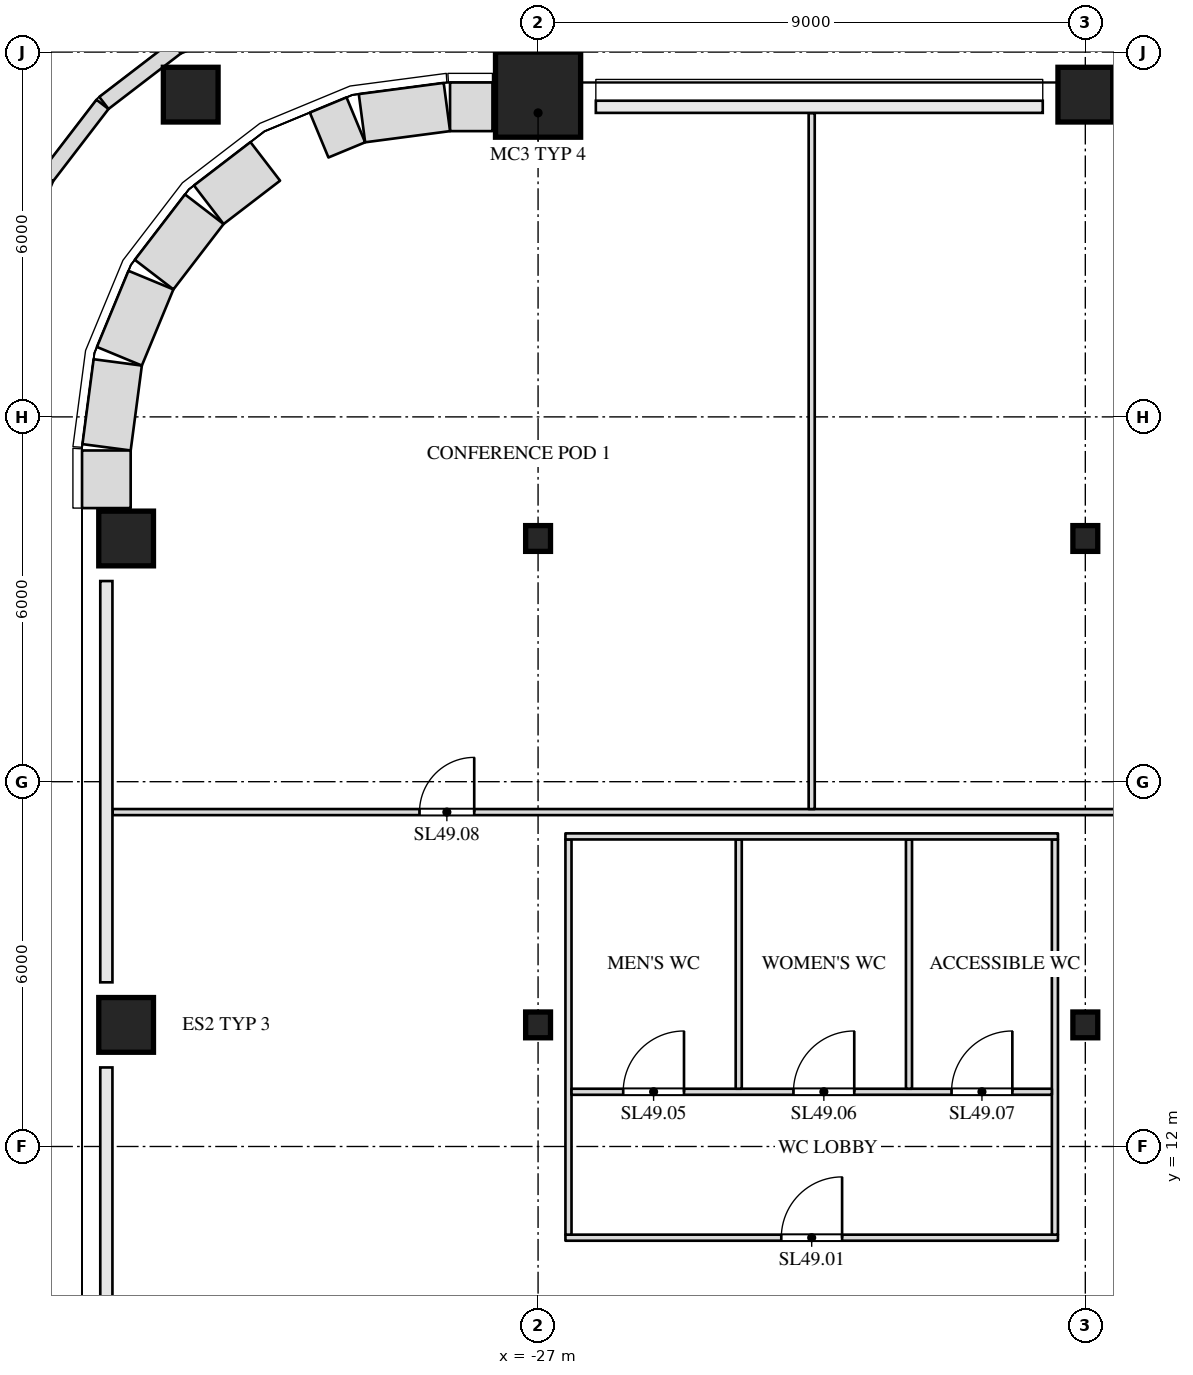
"""IFC4 building model, lengths in metres.
Left out: names, types, materials, properties, quantities, classifications, styles, units other than length and angle.
Written with IfcOpenShell. Run it as: python <this file> out.ifc"""

import sys

from ifc_helpers import new_model, si_unit, direction, frame, frame_2d, origin, origin_2d, place, context, subcontext, project, spatial, rectangle, i_section, extrude, clip, halfspace, element, fill, save


model = new_model("IFC4")
c1 = context("Model", 3, precision=1e-05, world=origin(), true_north=direction((0.0, 1.0)))
c2 = subcontext(c1, "Body", "Model", "MODEL_VIEW")
j1 = project(units=[si_unit("LENGTHUNIT", "METRE"), si_unit("PLANEANGLEUNIT", "RADIAN")], contexts=[c1])
p1 = place(None, origin())
s1 = spatial("IfcSite", under=j1, at=p1, CompositionType="ELEMENT")
p2 = place(p1, origin())
s2 = spatial("IfcBuilding", under=s1, at=p2, CompositionType="ELEMENT")
p3 = place(p2, frame((0.0, 0.0, 212.5)))
s3 = spatial("IfcBuildingStorey", under=s2, at=p3, CompositionType="ELEMENT", Elevation=212.5)
p4 = place(p3, frame((-32.5, 14.0, 0.0), z_axis=(-0.728199992693, 0.0, 0.685364699005), x_axis=(0.0, -1.0, 0.0)))
e1 = element("IfcColumn", 1, at=p4, inside=s3, PredefinedType="COLUMN", context=c2, shape_type="Clipping", body=[
    clip(extrude(rectangle(XDim=0.9, YDim=0.9, at=origin_2d()), origin(), (0.0, 0.0, 1.0), 5.836), halfspace(frame((0.0, 0.0, 0.478)), True)),
])
for number, where, z_axis, x_axis in (
    (2, (-27.0, 14.0, 0.0), (0.0, 0.0, 1.0), (1.0, 0.0, 0.0)),
    (3, (-18.0, 14.0, 0.0), (0.0, 0.0, 1.0), (1.0, 0.0, 0.0)),
):
    element("IfcColumn", number, at=place(p3, frame(where, z_axis=z_axis, x_axis=x_axis)), inside=s3, PredefinedType="COLUMN", context=c2, shape_type="SweptSolid", body=[
        extrude(i_section(OverallWidth=0.409, OverallDepth=0.424, WebThickness=0.033, FlangeThickness=0.052, at=origin_2d()), origin(), (0.0, 0.0, 1.0), 4.0),
    ])
p5 = place(p3, frame((-32.5, 22.0, 0.0), z_axis=(-0.728199992693, 0.0, 0.685364699005), x_axis=(0.0, -1.0, 0.0)))
e4 = element("IfcColumn", 4, at=p5, inside=s3, PredefinedType="COLUMN", context=c2, shape_type="Clipping", body=[
    clip(extrude(rectangle(XDim=0.9, YDim=0.9, at=origin_2d()), origin(), (0.0, 0.0, 1.0), 5.836), halfspace(frame((0.0, 0.0, 0.478)), True)),
])
for number, where, z_axis, x_axis in (
    (5, (-27.0, 22.0, 0.0), (0.0, 0.0, 1.0), (1.0, 0.0, 0.0)),
    (6, (-18.0, 22.0, 0.0), (0.0, 0.0, 1.0), (1.0, 0.0, 0.0)),
):
    element("IfcColumn", number, at=place(p3, frame(where, z_axis=z_axis, x_axis=x_axis)), inside=s3, PredefinedType="COLUMN", context=c2, shape_type="SweptSolid", body=[
        extrude(i_section(OverallWidth=0.409, OverallDepth=0.424, WebThickness=0.033, FlangeThickness=0.052, at=origin_2d()), origin(), (0.0, 0.0, 1.0), 4.0),
    ])
p6 = place(p3, frame((-31.25, 29.0, 0.0), z_axis=(-0.76353256999, 0.156622065639, 0.626488262556), x_axis=(-0.200944143721, -0.979602700641, 0.0)))
e7 = element("IfcColumn", 7, at=p6, inside=s3, PredefinedType="COLUMN", context=c2, shape_type="Clipping", body=[
    clip(extrude(rectangle(XDim=0.9, YDim=0.9, at=origin_2d()), origin(), (0.0, 0.0, 1.0), 6.385), halfspace(frame((0.0, 0.0, 0.56)), True)),
])
p7 = place(p3, frame((-27.0, 29.0, 0.0), z_axis=(0.0, 0.242535625036, 0.970142500145), x_axis=(-1.0, 0.0, 0.0)))
e8 = element("IfcColumn", 8, at=p7, inside=s3, PredefinedType="COLUMN", context=c2, shape_type="Clipping", body=[
    clip(extrude(rectangle(XDim=1.4, YDim=1.4, at=origin_2d()), origin(), (0.0, 0.0, 1.0), 4.123), halfspace(frame((0.0, 0.0, 0.175)), True)),
])
p8 = place(p3, frame((-18.0, 29.0, 0.0), z_axis=(0.0, 0.242535625036, 0.970142500145), x_axis=(-1.0, 0.0, 0.0)))
e9 = element("IfcColumn", 9, at=p8, inside=s3, PredefinedType="COLUMN", context=c2, shape_type="Clipping", body=[
    clip(extrude(rectangle(XDim=0.9, YDim=0.9, at=origin_2d()), origin(), (0.0, 0.0, 1.0), 4.123), halfspace(frame((0.0, 0.0, 0.113)), True)),
])
p9 = place(p3, frame((-26.55, 10.5, 0.0), z_axis=(0.0, 0.0, 1.0), x_axis=(1.0, 0.0, 0.0)))
e10 = element("IfcWall", 10, at=p9, inside=s3, PredefinedType="PARTITIONING", context=c2, shape_type="SweptSolid", body=[
    extrude(rectangle(XDim=8.1, YDim=0.1, at=frame_2d((4.05, 0.0))), origin(), (0.0, 0.0, 1.0), 3.65),
])
p10 = place(p9, frame((3.55, 0.0, 0.0)))
e11 = element("IfcOpeningElement", 11, at=p10, cuts=e10, PredefinedType="OPENING", context=c2, shape_type="SweptSolid", body=[
    extrude(rectangle(XDim=1.0, YDim=2.1, at=frame_2d((0.5, 1.05))), frame((0.0, 0.062, 0.0), z_axis=(0.0, -1.0, 0.0), x_axis=(1.0, 0.0, 0.0)), (0.0, 0.0, 1.0), 0.124),
])
for number, where, z_axis, x_axis in (
    (12, (-26.5, 10.55, 0.0), (0.0, 0.0, 1.0), (0.0, 1.0, 0.0)),
    (13, (-18.5, 10.55, 0.0), (0.0, 0.0, 1.0), (0.0, 1.0, 0.0)),
):
    element("IfcWall", number, at=place(p3, frame(where, z_axis=z_axis, x_axis=x_axis)), inside=s3, PredefinedType="PARTITIONING", context=c2, shape_type="SweptSolid", body=[
        extrude(rectangle(XDim=6.5, YDim=0.1, at=frame_2d((3.25, 0.0))), origin(), (0.0, 0.0, 1.0), 3.65),
    ])
p11 = place(p3, frame((-26.45, 12.9, 0.0), z_axis=(0.0, 0.0, 1.0), x_axis=(1.0, 0.0, 0.0)))
e14 = element("IfcWall", 14, at=p11, inside=s3, PredefinedType="PARTITIONING", context=c2, shape_type="SweptSolid", body=[
    extrude(rectangle(XDim=7.9, YDim=0.1, at=frame_2d((3.95, 0.0))), origin(), (0.0, 0.0, 1.0), 3.65),
])
p12 = place(p11, frame((0.85, 0.0, 0.0)))
e15 = element("IfcOpeningElement", 15, at=p12, cuts=e14, PredefinedType="OPENING", context=c2, shape_type="SweptSolid", body=[
    extrude(rectangle(XDim=1.0, YDim=2.1, at=frame_2d((0.5, 1.05))), frame((0.0, 0.062, 0.0), z_axis=(0.0, -1.0, 0.0), x_axis=(1.0, 0.0, 0.0)), (0.0, 0.0, 1.0), 0.124),
])
p13 = place(p11, frame((3.65, 0.0, 0.0)))
e16 = element("IfcOpeningElement", 16, at=p13, cuts=e14, PredefinedType="OPENING", context=c2, shape_type="SweptSolid", body=[
    extrude(rectangle(XDim=1.0, YDim=2.1, at=frame_2d((0.5, 1.05))), frame((0.0, 0.062, 0.0), z_axis=(0.0, -1.0, 0.0), x_axis=(1.0, 0.0, 0.0)), (0.0, 0.0, 1.0), 0.124),
])
p14 = place(p11, frame((6.25, 0.0, 0.0)))
e17 = element("IfcOpeningElement", 17, at=p14, cuts=e14, PredefinedType="OPENING", context=c2, shape_type="SweptSolid", body=[
    extrude(rectangle(XDim=1.0, YDim=2.1, at=frame_2d((0.5, 1.05))), frame((0.0, 0.062, 0.0), z_axis=(0.0, -1.0, 0.0), x_axis=(1.0, 0.0, 0.0)), (0.0, 0.0, 1.0), 0.124),
])
for number, where, z_axis, x_axis in (
    (18, (-23.7, 12.95, 0.0), (0.0, 0.0, 1.0), (0.0, 1.0, 0.0)),
    (19, (-20.9, 12.95, 0.0), (0.0, 0.0, 1.0), (0.0, 1.0, 0.0)),
):
    element("IfcWall", number, at=place(p3, frame(where, z_axis=z_axis, x_axis=x_axis)), inside=s3, PredefinedType="PARTITIONING", context=c2, shape_type="SweptSolid", body=[
        extrude(rectangle(XDim=4.1, YDim=0.1, at=frame_2d((2.05, 0.0))), origin(), (0.0, 0.0, 1.0), 3.65),
    ])
p15 = place(p3, frame((-26.55, 17.1, 0.0), z_axis=(0.0, 0.0, 1.0), x_axis=(1.0, 0.0, 0.0)))
e20 = element("IfcWall", 20, at=p15, inside=s3, PredefinedType="PARTITIONING", context=c2, shape_type="SweptSolid", body=[
    extrude(rectangle(XDim=8.1, YDim=0.1, at=frame_2d((4.05, 0.0))), origin(), (0.0, 0.0, 1.0), 3.65),
])
p16 = place(p3, frame((-33.996, 17.5, 0.0), z_axis=(0.0, 0.0, 1.0), x_axis=(1.0, 0.0, 0.0)))
e21 = element("IfcWall", 21, at=p16, inside=s3, PredefinedType="PARTITIONING", context=c2, shape_type="SweptSolid", body=[
    extrude(rectangle(XDim=67.992, YDim=0.1, at=frame_2d((33.996, 0.0))), origin(), (0.0, 0.0, 1.0), 3.65),
])
p17 = place(p16, frame((5.046, 0.0, 0.0)))
e22 = element("IfcOpeningElement", 22, at=p17, cuts=e21, PredefinedType="OPENING", context=c2, shape_type="SweptSolid", body=[
    extrude(rectangle(XDim=0.9, YDim=2.1, at=frame_2d((0.45, 1.05))), frame((0.0, 0.062, 0.0), z_axis=(0.0, -1.0, 0.0), x_axis=(1.0, 0.0, 0.0)), (0.0, 0.0, 1.0), 0.124),
])
p18 = place(p16, frame((17.796, 0.0, 0.0)))
e23 = element("IfcOpeningElement", 23, at=p18, cuts=e21, PredefinedType="OPENING", context=c2, shape_type="SweptSolid", body=[
    extrude(rectangle(XDim=0.9, YDim=2.1, at=frame_2d((0.45, 1.05))), frame((0.0, 0.062, 0.0), z_axis=(0.0, -1.0, 0.0), x_axis=(1.0, 0.0, 0.0)), (0.0, 0.0, 1.0), 0.124),
])
p19 = place(p16, frame((31.296, 0.0, 0.0)))
e24 = element("IfcOpeningElement", 24, at=p19, cuts=e21, PredefinedType="OPENING", context=c2, shape_type="SweptSolid", body=[
    extrude(rectangle(XDim=0.9, YDim=2.1, at=frame_2d((0.45, 1.05))), frame((0.0, 0.062, 0.0), z_axis=(0.0, -1.0, 0.0), x_axis=(1.0, 0.0, 0.0)), (0.0, 0.0, 1.0), 0.124),
])
p20 = place(p16, frame((44.796, 0.0, 0.0)))
e25 = element("IfcOpeningElement", 25, at=p20, cuts=e21, PredefinedType="OPENING", context=c2, shape_type="SweptSolid", body=[
    extrude(rectangle(XDim=0.9, YDim=2.1, at=frame_2d((0.45, 1.05))), frame((0.0, 0.062, 0.0), z_axis=(0.0, -1.0, 0.0), x_axis=(1.0, 0.0, 0.0)), (0.0, 0.0, 1.0), 0.124),
])
p21 = place(p16, frame((56.046, 0.0, 0.0)))
e26 = element("IfcOpeningElement", 26, at=p21, cuts=e21, PredefinedType="OPENING", context=c2, shape_type="SweptSolid", body=[
    extrude(rectangle(XDim=0.9, YDim=2.1, at=frame_2d((0.45, 1.05))), frame((0.0, 0.062, 0.0), z_axis=(0.0, -1.0, 0.0), x_axis=(1.0, 0.0, 0.0)), (0.0, 0.0, 1.0), 0.124),
])
p22 = place(p16, frame((64.296, 0.0, 0.0)))
e27 = element("IfcOpeningElement", 27, at=p22, cuts=e21, PredefinedType="OPENING", context=c2, shape_type="SweptSolid", body=[
    extrude(rectangle(XDim=0.9, YDim=2.1, at=frame_2d((0.45, 1.05))), frame((0.0, 0.062, 0.0), z_axis=(0.0, -1.0, 0.0), x_axis=(1.0, 0.0, 0.0)), (0.0, 0.0, 1.0), 0.124),
])
p23 = place(p3, frame((-22.5, 17.55, 0.0), z_axis=(0.0, 0.0, 1.0), x_axis=(0.0, 1.0, 0.0)))
e28 = element("IfcWall", 28, at=p23, inside=s3, PredefinedType="PARTITIONING", context=c2, shape_type="SweptSolid", body=[
    extrude(rectangle(XDim=11.446, YDim=0.1, at=frame_2d((5.723, 0.0))), origin(), (0.0, 0.0, 1.0), 3.65),
])
p24 = place(p3, frame((-27.75, 29.1, 0.0), z_axis=(0.0, 0.0, 1.0), x_axis=(-1.0, 0.0, 0.0)))
e29 = element("IfcWall", 29, at=p24, inside=s3, PredefinedType="SOLIDWALL", context=c2, shape_type="SweptSolid", body=[
    extrude(rectangle(XDim=0.698, YDim=0.8, at=frame_2d((0.349, 0.0))), origin(), (0.0, 0.0, 1.0), 3.65),
])
p25 = place(p3, frame((-28.5, 29.097, 0.0), z_axis=(0.0, 0.0, 1.0), x_axis=(-0.99144603414, -0.130517283865, 0.0)))
e30 = element("IfcWall", 30, at=p25, inside=s3, PredefinedType="SOLIDWALL", context=c2, shape_type="SweptSolid", body=[
    extrude(rectangle(XDim=1.408, YDim=0.8, at=frame_2d((0.704, 0.0))), origin(), (0.0, 0.0, 1.0), 3.65),
])
p26 = place(p3, frame((-29.997, 28.886, 0.0), z_axis=(0.0, 0.0, 1.0), x_axis=(-0.923816299568, -0.382836054536, 0.0)))
e31 = element("IfcWall", 31, at=p26, inside=s3, PredefinedType="SOLIDWALL", context=c2, shape_type="SweptSolid", body=[
    extrude(rectangle(XDim=0.653, YDim=0.8, at=frame_2d((0.327, 0.0))), origin(), (0.0, 0.0, 1.0), 3.65),
])
p27 = place(p3, frame((-31.487, 28.202, 0.0), z_axis=(0.0, 0.0, 1.0), x_axis=(-0.793321035123, -0.608803527611, 0.0)))
e32 = element("IfcWall", 32, at=p27, inside=s3, PredefinedType="SOLIDWALL", context=c2, shape_type="SweptSolid", body=[
    extrude(rectangle(XDim=1.171, YDim=0.8, at=frame_2d((0.585, 0.0))), origin(), (0.0, 0.0, 1.0), 3.65),
])
p28 = place(p3, frame((-32.489, 27.416, 0.0), z_axis=(0.0, 0.0, 1.0), x_axis=(-0.608866226366, -0.793272915452, 0.0)))
e33 = element("IfcWall", 33, at=p28, inside=s3, PredefinedType="SOLIDWALL", context=c2, shape_type="SweptSolid", body=[
    extrude(rectangle(XDim=1.356, YDim=0.8, at=frame_2d((0.678, 0.0))), origin(), (0.0, 0.0, 1.0), 3.65),
])
p29 = place(p3, frame((-33.367, 26.25, 0.0), z_axis=(0.0, 0.0, 1.0), x_axis=(-0.38276009378, -0.923847774587, 0.0)))
e34 = element("IfcWall", 34, at=p29, inside=s3, PredefinedType="SOLIDWALL", context=c2, shape_type="SweptSolid", body=[
    extrude(rectangle(XDim=1.355, YDim=0.8, at=frame_2d((0.678, 0.0))), origin(), (0.0, 0.0, 1.0), 3.65),
])
p30 = place(p3, frame((-33.913, 24.896, 0.0), z_axis=(0.0, 0.0, 1.0), x_axis=(-0.130517283865, -0.99144603414, 0.0)))
e35 = element("IfcWall", 35, at=p30, inside=s3, PredefinedType="SOLIDWALL", context=c2, shape_type="SweptSolid", body=[
    extrude(rectangle(XDim=1.408, YDim=0.8, at=frame_2d((0.704, 0.0))), origin(), (0.0, 0.0, 1.0), 3.65),
])
p31 = place(p3, frame((-34.1, 23.448, 0.0), z_axis=(0.0, 0.0, 1.0), x_axis=(0.0, -1.0, 0.0)))
e36 = element("IfcWall", 36, at=p31, inside=s3, PredefinedType="SOLIDWALL", context=c2, shape_type="SweptSolid", body=[
    extrude(rectangle(XDim=0.948, YDim=0.8, at=frame_2d((0.474, 0.0))), origin(), (0.0, 0.0, 1.0), 3.65),
])
for number, where, z_axis, x_axis in (
    (37, (-31.535, 30.667, 0.0), (0.0, 0.0, 1.0), (-0.924, -0.383, 0.0)),
    (38, (-32.95, 30.077, 0.0), (0.0, 0.0, 1.0), (-0.793, -0.609, 0.0)),
    (39, (-34.164, 29.14, 0.0), (0.0, 0.0, 1.0), (-0.609, -0.793, 0.0)),
    (40, (-35.093, 27.922, 0.0), (0.0, 0.0, 1.0), (-0.383, -0.924, 0.0)),
):
    element("IfcWall", number, at=place(p3, frame(where, z_axis=z_axis, x_axis=x_axis)), inside=s3, PredefinedType="PARAPET", context=c2, shape_type="SweptSolid", body=[
        extrude(rectangle(XDim=1.5, YDim=0.25, at=frame_2d((0.75, 0.0))), origin(), (0.0, 0.0, 1.0), 1.1),
    ])
p32 = place(p10, origin())
e41 = element("IfcDoor", 41, at=p32, inside=s3, OperationType="SINGLE_SWING_RIGHT", PredefinedType="DOOR", context=c2, shape_type="SweptSolid", body=[
    extrude(rectangle(XDim=1.0, YDim=2.1, at=frame_2d((0.5, 1.05))), frame((0.0, 0.025, 0.0), z_axis=(0.0, -1.0, 0.0), x_axis=(1.0, 0.0, 0.0)), (0.0, 0.0, 1.0), 0.05),
])
fill(e11, e41)
p33 = place(p12, origin())
e42 = element("IfcDoor", 42, at=p33, inside=s3, OperationType="SINGLE_SWING_RIGHT", PredefinedType="DOOR", context=c2, shape_type="SweptSolid", body=[
    extrude(rectangle(XDim=1.0, YDim=2.1, at=frame_2d((0.5, 1.05))), frame((0.0, 0.025, 0.0), z_axis=(0.0, -1.0, 0.0), x_axis=(1.0, 0.0, 0.0)), (0.0, 0.0, 1.0), 0.05),
])
fill(e15, e42)
p34 = place(p13, origin())
e43 = element("IfcDoor", 43, at=p34, inside=s3, OperationType="SINGLE_SWING_RIGHT", PredefinedType="DOOR", context=c2, shape_type="SweptSolid", body=[
    extrude(rectangle(XDim=1.0, YDim=2.1, at=frame_2d((0.5, 1.05))), frame((0.0, 0.025, 0.0), z_axis=(0.0, -1.0, 0.0), x_axis=(1.0, 0.0, 0.0)), (0.0, 0.0, 1.0), 0.05),
])
fill(e16, e43)
p35 = place(p14, origin())
e44 = element("IfcDoor", 44, at=p35, inside=s3, OperationType="SINGLE_SWING_RIGHT", PredefinedType="DOOR", context=c2, shape_type="SweptSolid", body=[
    extrude(rectangle(XDim=1.0, YDim=2.1, at=frame_2d((0.5, 1.05))), frame((0.0, 0.025, 0.0), z_axis=(0.0, -1.0, 0.0), x_axis=(1.0, 0.0, 0.0)), (0.0, 0.0, 1.0), 0.05),
])
fill(e17, e44)
p36 = place(p17, origin())
e45 = element("IfcDoor", 45, at=p36, inside=s3, OperationType="SINGLE_SWING_RIGHT", PredefinedType="DOOR", context=c2, shape_type="SweptSolid", body=[
    extrude(rectangle(XDim=0.9, YDim=2.1, at=frame_2d((0.45, 1.05))), frame((0.0, 0.025, 0.0), z_axis=(0.0, -1.0, 0.0), x_axis=(1.0, 0.0, 0.0)), (0.0, 0.0, 1.0), 0.05),
])
fill(e22, e45)
save(model, sys.argv[1])
